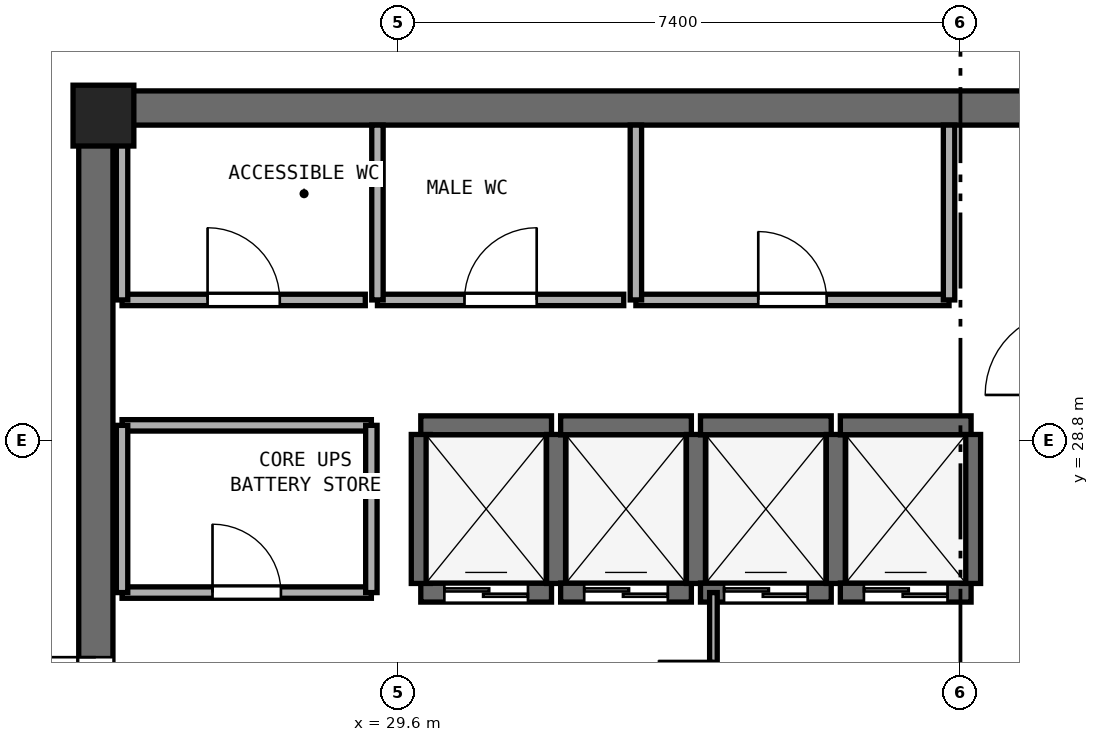
"""IFC4 building model, lengths in metres.
Left out: names, types, materials, properties, quantities, classifications, styles, units other than length and angle.
Written with IfcOpenShell. Run it as: python <this file> out.ifc"""

import sys

from ifc_helpers import new_model, si_unit, direction, frame, frame_2d, origin, origin_2d, place, context, subcontext, project, spatial, rectangle, extrude, element, fill, save


model = new_model("IFC4")
c1 = context("Model", 3, precision=1e-05, world=origin(), true_north=direction((0.0, 1.0)))
c2 = subcontext(c1, "Body", "Model", "MODEL_VIEW")
j1 = project(units=[si_unit("LENGTHUNIT", "METRE"), si_unit("PLANEANGLEUNIT", "RADIAN")], contexts=[c1])
p1 = place(None, origin())
s1 = spatial("IfcSite", under=j1, at=p1, CompositionType="ELEMENT")
p2 = place(p1, origin())
s2 = spatial("IfcBuilding", under=s1, at=p2, CompositionType="ELEMENT")
p3 = place(p2, frame((0.0, 0.0, 247.8)))
s3 = spatial("IfcBuildingStorey", under=s2, at=p3, CompositionType="ELEMENT", Elevation=247.8)
p4 = place(p3, frame((25.4, 33.175, 0.0), z_axis=(0.0, 0.0, 1.0), x_axis=(1.0, 0.0, 0.0)))
e1 = element("IfcWall", 1, at=p4, inside=s3, PredefinedType="SHEAR", context=c2, shape_type="SweptSolid", body=[
    extrude(rectangle(XDim=23.2, YDim=0.45, at=frame_2d((11.6, 0.0))), origin(), (0.0, 0.0, 1.0), 3.51),
])
p5 = place(p3, frame((25.625, 17.45, 0.0), z_axis=(0.0, 0.0, 1.0), x_axis=(0.0, 1.0, 0.0)))
e2 = element("IfcWall", 2, at=p5, inside=s3, PredefinedType="SHEAR", context=c2, shape_type="SweptSolid", body=[
    extrude(rectangle(XDim=15.5, YDim=0.45, at=frame_2d((7.75, 0.0))), origin(), (0.0, 0.0, 1.0), 3.51),
])
p6 = place(p5, frame((7.0, 0.0, 0.0)))
e3 = element("IfcOpeningElement", 3, at=p6, cuts=e2, PredefinedType="OPENING", context=c2, shape_type="SweptSolid", body=[
    extrude(rectangle(XDim=1.5, YDim=2.15, at=frame_2d((0.75, 1.075))), frame((0.0, 0.235, 0.0), z_axis=(0.0, -1.0, 0.0), x_axis=(1.0, 0.0, 0.0)), (0.0, 0.0, 1.0), 0.47),
])
p7 = place(p3, frame((25.725, 33.075, 0.0), z_axis=(0.0, 0.0, 1.0), x_axis=(1.0, 0.0, 0.0)))
e4 = element("IfcColumn", 4, at=p7, inside=s3, PredefinedType="PILASTER", context=c2, shape_type="SweptSolid", body=[
    extrude(rectangle(XDim=0.8, YDim=0.8, at=origin_2d()), origin(), (0.0, 0.0, 1.0), 3.8),
])
p8 = place(p3, frame((29.9, 26.8, 0.0), z_axis=(0.0, 0.0, 1.0), x_axis=(1.0, 0.0, 0.0)))
e5 = element("IfcWall", 5, at=p8, inside=s3, PredefinedType="SHEAR", context=c2, shape_type="SweptSolid", body=[
    extrude(rectangle(XDim=1.72, YDim=0.25, at=frame_2d((0.86, 0.0))), origin(), (0.0, 0.0, 1.0), 3.51),
])
p9 = place(p8, frame((0.31, 0.0, 0.0)))
e6 = element("IfcOpeningElement", 6, at=p9, cuts=e5, PredefinedType="OPENING", context=c2, shape_type="SweptSolid", body=[
    extrude(rectangle(XDim=1.1, YDim=2.15, at=frame_2d((0.55, 1.075))), frame((0.0, 0.135, 0.0), z_axis=(0.0, -1.0, 0.0), x_axis=(1.0, 0.0, 0.0)), (0.0, 0.0, 1.0), 0.27),
])
p10 = place(p3, frame((29.9, 29.0, 0.0), z_axis=(0.0, 0.0, 1.0), x_axis=(1.0, 0.0, 0.0)))
e7 = element("IfcWall", 7, at=p10, inside=s3, PredefinedType="SHEAR", context=c2, shape_type="SweptSolid", body=[
    extrude(rectangle(XDim=1.72, YDim=0.25, at=frame_2d((0.86, 0.0))), origin(), (0.0, 0.0, 1.0), 3.51),
])
for number, where, z_axis, x_axis in (
    (8, (29.9, 26.92, 0.0), (0.0, 0.0, 1.0), (0.0, 1.0, 0.0)),
    (9, (31.68, 26.92, 0.0), (0.0, 0.0, 1.0), (0.0, 1.0, 0.0)),
):
    element("IfcWall", number, at=place(p3, frame(where, z_axis=z_axis, x_axis=x_axis)), inside=s3, PredefinedType="SHEAR", context=c2, shape_type="SweptSolid", body=[
        extrude(rectangle(XDim=1.96, YDim=0.25, at=frame_2d((0.98, 0.0))), origin(), (0.0, 0.0, 1.0), 3.51),
    ])
p11 = place(p3, frame((31.74, 26.8, 0.0), z_axis=(0.0, 0.0, 1.0), x_axis=(1.0, 0.0, 0.0)))
e10 = element("IfcWall", 10, at=p11, inside=s3, PredefinedType="SHEAR", context=c2, shape_type="SweptSolid", body=[
    extrude(rectangle(XDim=1.72, YDim=0.25, at=frame_2d((0.86, 0.0))), origin(), (0.0, 0.0, 1.0), 3.51),
])
p12 = place(p11, frame((0.31, 0.0, 0.0)))
e11 = element("IfcOpeningElement", 11, at=p12, cuts=e10, PredefinedType="OPENING", context=c2, shape_type="SweptSolid", body=[
    extrude(rectangle(XDim=1.1, YDim=2.15, at=frame_2d((0.55, 1.075))), frame((0.0, 0.135, 0.0), z_axis=(0.0, -1.0, 0.0), x_axis=(1.0, 0.0, 0.0)), (0.0, 0.0, 1.0), 0.27),
])
p13 = place(p3, frame((31.74, 29.0, 0.0), z_axis=(0.0, 0.0, 1.0), x_axis=(1.0, 0.0, 0.0)))
e12 = element("IfcWall", 12, at=p13, inside=s3, PredefinedType="SHEAR", context=c2, shape_type="SweptSolid", body=[
    extrude(rectangle(XDim=1.72, YDim=0.25, at=frame_2d((0.86, 0.0))), origin(), (0.0, 0.0, 1.0), 3.51),
])
p14 = place(p3, frame((33.52, 26.92, 0.0), z_axis=(0.0, 0.0, 1.0), x_axis=(0.0, 1.0, 0.0)))
e13 = element("IfcWall", 13, at=p14, inside=s3, PredefinedType="SHEAR", context=c2, shape_type="SweptSolid", body=[
    extrude(rectangle(XDim=1.96, YDim=0.25, at=frame_2d((0.98, 0.0))), origin(), (0.0, 0.0, 1.0), 3.51),
])
p15 = place(p3, frame((33.58, 26.8, 0.0), z_axis=(0.0, 0.0, 1.0), x_axis=(1.0, 0.0, 0.0)))
e14 = element("IfcWall", 14, at=p15, inside=s3, PredefinedType="SHEAR", context=c2, shape_type="SweptSolid", body=[
    extrude(rectangle(XDim=1.72, YDim=0.25, at=frame_2d((0.86, 0.0))), origin(), (0.0, 0.0, 1.0), 3.51),
])
p16 = place(p15, frame((0.31, 0.0, 0.0)))
e15 = element("IfcOpeningElement", 15, at=p16, cuts=e14, PredefinedType="OPENING", context=c2, shape_type="SweptSolid", body=[
    extrude(rectangle(XDim=1.1, YDim=2.15, at=frame_2d((0.55, 1.075))), frame((0.0, 0.135, 0.0), z_axis=(0.0, -1.0, 0.0), x_axis=(1.0, 0.0, 0.0)), (0.0, 0.0, 1.0), 0.27),
])
p17 = place(p3, frame((33.58, 29.0, 0.0), z_axis=(0.0, 0.0, 1.0), x_axis=(1.0, 0.0, 0.0)))
e16 = element("IfcWall", 16, at=p17, inside=s3, PredefinedType="SHEAR", context=c2, shape_type="SweptSolid", body=[
    extrude(rectangle(XDim=1.72, YDim=0.25, at=frame_2d((0.86, 0.0))), origin(), (0.0, 0.0, 1.0), 3.51),
])
p18 = place(p3, frame((35.36, 26.92, 0.0), z_axis=(0.0, 0.0, 1.0), x_axis=(0.0, 1.0, 0.0)))
e17 = element("IfcWall", 17, at=p18, inside=s3, PredefinedType="SHEAR", context=c2, shape_type="SweptSolid", body=[
    extrude(rectangle(XDim=1.96, YDim=0.25, at=frame_2d((0.98, 0.0))), origin(), (0.0, 0.0, 1.0), 3.51),
])
p19 = place(p3, frame((35.42, 26.8, 0.0), z_axis=(0.0, 0.0, 1.0), x_axis=(1.0, 0.0, 0.0)))
e18 = element("IfcWall", 18, at=p19, inside=s3, PredefinedType="SHEAR", context=c2, shape_type="SweptSolid", body=[
    extrude(rectangle(XDim=1.72, YDim=0.25, at=frame_2d((0.86, 0.0))), origin(), (0.0, 0.0, 1.0), 3.51),
])
p20 = place(p19, frame((0.31, 0.0, 0.0)))
e19 = element("IfcOpeningElement", 19, at=p20, cuts=e18, PredefinedType="OPENING", context=c2, shape_type="SweptSolid", body=[
    extrude(rectangle(XDim=1.1, YDim=2.15, at=frame_2d((0.55, 1.075))), frame((0.0, 0.135, 0.0), z_axis=(0.0, -1.0, 0.0), x_axis=(1.0, 0.0, 0.0)), (0.0, 0.0, 1.0), 0.27),
])
p21 = place(p3, frame((35.42, 29.0, 0.0), z_axis=(0.0, 0.0, 1.0), x_axis=(1.0, 0.0, 0.0)))
e20 = element("IfcWall", 20, at=p21, inside=s3, PredefinedType="SHEAR", context=c2, shape_type="SweptSolid", body=[
    extrude(rectangle(XDim=1.72, YDim=0.25, at=frame_2d((0.86, 0.0))), origin(), (0.0, 0.0, 1.0), 3.51),
])
p22 = place(p3, frame((37.14, 26.92, 0.0), z_axis=(0.0, 0.0, 1.0), x_axis=(0.0, 1.0, 0.0)))
e21 = element("IfcWall", 21, at=p22, inside=s3, PredefinedType="SHEAR", context=c2, shape_type="SweptSolid", body=[
    extrude(rectangle(XDim=1.96, YDim=0.25, at=frame_2d((0.98, 0.0))), origin(), (0.0, 0.0, 1.0), 3.51),
])
p23 = place(p3, frame((25.97, 30.65, 0.0), z_axis=(0.0, 0.0, 1.0), x_axis=(1.0, 0.0, 0.0)))
e22 = element("IfcWall", 22, at=p23, inside=s3, PredefinedType="PARTITIONING", context=c2, shape_type="SweptSolid", body=[
    extrude(rectangle(XDim=3.2, YDim=0.15, at=frame_2d((1.6, 0.0))), origin(), (0.0, 0.0, 1.0), 3.51),
])
p24 = place(p23, frame((1.125, 0.0, 0.0)))
e23 = element("IfcOpeningElement", 23, at=p24, cuts=e22, PredefinedType="OPENING", context=c2, shape_type="SweptSolid", body=[
    extrude(rectangle(XDim=0.95, YDim=2.1, at=frame_2d((0.475, 1.05))), frame((0.0, 0.085, 0.0), z_axis=(0.0, -1.0, 0.0), x_axis=(1.0, 0.0, 0.0)), (0.0, 0.0, 1.0), 0.17),
])
p25 = place(p3, frame((25.97, 30.65, 0.0), z_axis=(0.0, 0.0, 1.0), x_axis=(0.0, 1.0, 0.0)))
e24 = element("IfcWall", 24, at=p25, inside=s3, PredefinedType="PARTITIONING", context=c2, shape_type="SweptSolid", body=[
    extrude(rectangle(XDim=2.3, YDim=0.15, at=frame_2d((1.15, 0.0))), origin(), (0.0, 0.0, 1.0), 2.61),
])
p26 = place(p3, frame((29.33, 30.65, 0.0), z_axis=(0.0, 0.0, 1.0), x_axis=(1.0, 0.0, 0.0)))
e25 = element("IfcWall", 25, at=p26, inside=s3, PredefinedType="PARTITIONING", context=c2, shape_type="SweptSolid", body=[
    extrude(rectangle(XDim=3.24, YDim=0.15, at=frame_2d((1.62, 0.0))), origin(), (0.0, 0.0, 1.0), 3.51),
])
p27 = place(p26, frame((1.145, 0.0, 0.0)))
e26 = element("IfcOpeningElement", 26, at=p27, cuts=e25, PredefinedType="OPENING", context=c2, shape_type="SweptSolid", body=[
    extrude(rectangle(XDim=0.95, YDim=2.1, at=frame_2d((0.475, 1.05))), frame((0.0, 0.085, 0.0), z_axis=(0.0, -1.0, 0.0), x_axis=(1.0, 0.0, 0.0)), (0.0, 0.0, 1.0), 0.17),
])
p28 = place(p3, frame((29.33, 30.65, 0.0), z_axis=(0.0, 0.0, 1.0), x_axis=(0.0, 1.0, 0.0)))
e27 = element("IfcWall", 27, at=p28, inside=s3, PredefinedType="PARTITIONING", context=c2, shape_type="SweptSolid", body=[
    extrude(rectangle(XDim=2.3, YDim=0.15, at=frame_2d((1.15, 0.0))), origin(), (0.0, 0.0, 1.0), 3.51),
])
p29 = place(p3, frame((32.73, 30.65, 0.0), z_axis=(0.0, 0.0, 1.0), x_axis=(1.0, 0.0, 0.0)))
e28 = element("IfcWall", 28, at=p29, inside=s3, PredefinedType="PARTITIONING", context=c2, shape_type="SweptSolid", body=[
    extrude(rectangle(XDim=4.12, YDim=0.15, at=frame_2d((2.06, 0.0))), origin(), (0.0, 0.0, 1.0), 3.51),
])
p30 = place(p29, frame((1.61, 0.0, 0.0)))
e29 = element("IfcOpeningElement", 29, at=p30, cuts=e28, PredefinedType="OPENING", context=c2, shape_type="SweptSolid", body=[
    extrude(rectangle(XDim=0.9, YDim=2.1, at=frame_2d((0.45, 1.05))), frame((0.0, 0.085, 0.0), z_axis=(0.0, -1.0, 0.0), x_axis=(1.0, 0.0, 0.0)), (0.0, 0.0, 1.0), 0.17),
])
for number, where, z_axis, x_axis in (
    (30, (32.73, 30.65, 0.0), (0.0, 0.0, 1.0), (0.0, 1.0, 0.0)),
    (31, (36.85, 30.65, 0.0), (0.0, 0.0, 1.0), (0.0, 1.0, 0.0)),
):
    element("IfcWall", number, at=place(p3, frame(where, z_axis=z_axis, x_axis=x_axis)), inside=s3, PredefinedType="PARTITIONING", context=c2, shape_type="SweptSolid", body=[
        extrude(rectangle(XDim=2.3, YDim=0.15, at=frame_2d((1.15, 0.0))), origin(), (0.0, 0.0, 1.0), 3.51),
    ])
p31 = place(p3, frame((25.97, 26.8, 0.0), z_axis=(0.0, 0.0, 1.0), x_axis=(1.0, 0.0, 0.0)))
e32 = element("IfcWall", 32, at=p31, inside=s3, PredefinedType="PARTITIONING", context=c2, shape_type="SweptSolid", body=[
    extrude(rectangle(XDim=3.28, YDim=0.15, at=frame_2d((1.64, 0.0))), origin(), (0.0, 0.0, 1.0), 3.51),
])
p32 = place(p31, frame((1.19, 0.0, 0.0)))
e33 = element("IfcOpeningElement", 33, at=p32, cuts=e32, PredefinedType="OPENING", context=c2, shape_type="SweptSolid", body=[
    extrude(rectangle(XDim=0.9, YDim=2.1, at=frame_2d((0.45, 1.05))), frame((0.0, 0.085, 0.0), z_axis=(0.0, -1.0, 0.0), x_axis=(1.0, 0.0, 0.0)), (0.0, 0.0, 1.0), 0.17),
])
p33 = place(p3, frame((25.97, 29.0, 0.0), z_axis=(0.0, 0.0, 1.0), x_axis=(1.0, 0.0, 0.0)))
e34 = element("IfcWall", 34, at=p33, inside=s3, PredefinedType="PARTITIONING", context=c2, shape_type="SweptSolid", body=[
    extrude(rectangle(XDim=3.28, YDim=0.15, at=frame_2d((1.64, 0.0))), origin(), (0.0, 0.0, 1.0), 3.51),
])
p34 = place(p3, frame((25.97, 26.8, 0.0), z_axis=(0.0, 0.0, 1.0), x_axis=(0.0, 1.0, 0.0)))
e35 = element("IfcWall", 35, at=p34, inside=s3, PredefinedType="PARTITIONING", context=c2, shape_type="SweptSolid", body=[
    extrude(rectangle(XDim=2.2, YDim=0.15, at=frame_2d((1.1, 0.0))), origin(), (0.0, 0.0, 1.0), 2.61),
])
p35 = place(p3, frame((29.25, 26.8, 0.0), z_axis=(0.0, 0.0, 1.0), x_axis=(0.0, 1.0, 0.0)))
e36 = element("IfcWall", 36, at=p35, inside=s3, PredefinedType="PARTITIONING", context=c2, shape_type="SweptSolid", body=[
    extrude(rectangle(XDim=2.2, YDim=0.15, at=frame_2d((1.1, 0.0))), origin(), (0.0, 0.0, 1.0), 3.51),
])
p36 = place(p3, frame((33.75, 23.6, 0.0), z_axis=(0.0, 0.0, 1.0), x_axis=(0.0, 1.0, 0.0)))
e37 = element("IfcWall", 37, at=p36, inside=s3, PredefinedType="PARTITIONING", context=c2, shape_type="SweptSolid", body=[
    extrude(rectangle(XDim=3.2, YDim=0.1, at=frame_2d((1.6, 0.0))), origin(), (0.0, 0.0, 1.0), 3.51),
])
p37 = place(p36, frame((0.85, 0.0, 0.0)))
e38 = element("IfcOpeningElement", 38, at=p37, cuts=e37, PredefinedType="OPENING", context=c2, shape_type="SweptSolid", body=[
    extrude(rectangle(XDim=1.45, YDim=2.12, at=frame_2d((0.725, 1.06))), frame((0.0, 0.06, 0.0), z_axis=(0.0, -1.0, 0.0), x_axis=(1.0, 0.0, 0.0)), (0.0, 0.0, 1.0), 0.12),
])
p38 = place(p9, origin())
e39 = element("IfcDoor", 39, at=p38, inside=s3, OperationType="DOUBLE_DOOR_SLIDING", PredefinedType="DOOR", context=c2, shape_type="SweptSolid", body=[
    extrude(rectangle(XDim=1.1, YDim=2.15, at=frame_2d((0.55, 1.075))), frame((0.0, 0.025, 0.0), z_axis=(0.0, -1.0, 0.0), x_axis=(1.0, 0.0, 0.0)), (0.0, 0.0, 1.0), 0.05),
])
fill(e6, e39)
p39 = place(p12, origin())
e40 = element("IfcDoor", 40, at=p39, inside=s3, OperationType="DOUBLE_DOOR_SLIDING", PredefinedType="DOOR", context=c2, shape_type="SweptSolid", body=[
    extrude(rectangle(XDim=1.1, YDim=2.15, at=frame_2d((0.55, 1.075))), frame((0.0, 0.025, 0.0), z_axis=(0.0, -1.0, 0.0), x_axis=(1.0, 0.0, 0.0)), (0.0, 0.0, 1.0), 0.05),
])
fill(e11, e40)
p40 = place(p16, origin())
e41 = element("IfcDoor", 41, at=p40, inside=s3, OperationType="DOUBLE_DOOR_SLIDING", PredefinedType="DOOR", context=c2, shape_type="SweptSolid", body=[
    extrude(rectangle(XDim=1.1, YDim=2.15, at=frame_2d((0.55, 1.075))), frame((0.0, 0.025, 0.0), z_axis=(0.0, -1.0, 0.0), x_axis=(1.0, 0.0, 0.0)), (0.0, 0.0, 1.0), 0.05),
])
fill(e15, e41)
p41 = place(p20, origin())
e42 = element("IfcDoor", 42, at=p41, inside=s3, OperationType="DOUBLE_DOOR_SLIDING", PredefinedType="DOOR", context=c2, shape_type="SweptSolid", body=[
    extrude(rectangle(XDim=1.1, YDim=2.15, at=frame_2d((0.55, 1.075))), frame((0.0, 0.025, 0.0), z_axis=(0.0, -1.0, 0.0), x_axis=(1.0, 0.0, 0.0)), (0.0, 0.0, 1.0), 0.05),
])
fill(e19, e42)
p42 = place(p6, origin())
e43 = element("IfcDoor", 43, at=p42, inside=s3, OperationType="DOUBLE_DOOR_SINGLE_SWING", PredefinedType="DOOR", context=c2, shape_type="SweptSolid", body=[
    extrude(rectangle(XDim=1.5, YDim=2.15, at=frame_2d((0.75, 1.075))), frame((0.0, 0.025, 0.0), z_axis=(0.0, -1.0, 0.0), x_axis=(1.0, 0.0, 0.0)), (0.0, 0.0, 1.0), 0.05),
])
fill(e3, e43)
p43 = place(p24, origin())
e44 = element("IfcDoor", 44, at=p43, inside=s3, OperationType="SINGLE_SWING_LEFT", PredefinedType="DOOR", context=c2, shape_type="SweptSolid", body=[
    extrude(rectangle(XDim=0.95, YDim=2.1, at=frame_2d((0.475, 1.05))), frame((0.0, 0.025, 0.0), z_axis=(0.0, -1.0, 0.0), x_axis=(1.0, 0.0, 0.0)), (0.0, 0.0, 1.0), 0.05),
])
fill(e23, e44)
p44 = place(p27, origin())
e45 = element("IfcDoor", 45, at=p44, inside=s3, OperationType="SINGLE_SWING_RIGHT", PredefinedType="DOOR", context=c2, shape_type="SweptSolid", body=[
    extrude(rectangle(XDim=0.95, YDim=2.1, at=frame_2d((0.475, 1.05))), frame((0.0, 0.025, 0.0), z_axis=(0.0, -1.0, 0.0), x_axis=(1.0, 0.0, 0.0)), (0.0, 0.0, 1.0), 0.05),
])
fill(e26, e45)
p45 = place(p30, origin())
e46 = element("IfcDoor", 46, at=p45, inside=s3, OperationType="SINGLE_SWING_LEFT", PredefinedType="DOOR", context=c2, shape_type="SweptSolid", body=[
    extrude(rectangle(XDim=0.9, YDim=2.1, at=frame_2d((0.45, 1.05))), frame((0.0, 0.025, 0.0), z_axis=(0.0, -1.0, 0.0), x_axis=(1.0, 0.0, 0.0)), (0.0, 0.0, 1.0), 0.05),
])
fill(e29, e46)
p46 = place(p32, origin())
e47 = element("IfcDoor", 47, at=p46, inside=s3, OperationType="SINGLE_SWING_LEFT", PredefinedType="DOOR", context=c2, shape_type="SweptSolid", body=[
    extrude(rectangle(XDim=0.9, YDim=2.1, at=frame_2d((0.45, 1.05))), frame((0.0, 0.025, 0.0), z_axis=(0.0, -1.0, 0.0), x_axis=(1.0, 0.0, 0.0)), (0.0, 0.0, 1.0), 0.05),
])
fill(e33, e47)
p47 = place(p37, origin())
e48 = element("IfcDoor", 48, at=p47, inside=s3, OperationType="DOUBLE_DOOR_SINGLE_SWING", PredefinedType="DOOR", context=c2, shape_type="SweptSolid", body=[
    extrude(rectangle(XDim=1.45, YDim=2.12, at=frame_2d((0.725, 1.06))), frame((0.0, 0.025, 0.0), z_axis=(0.0, -1.0, 0.0), x_axis=(1.0, 0.0, 0.0)), (0.0, 0.0, 1.0), 0.05),
])
fill(e38, e48)
save(model, sys.argv[1])
